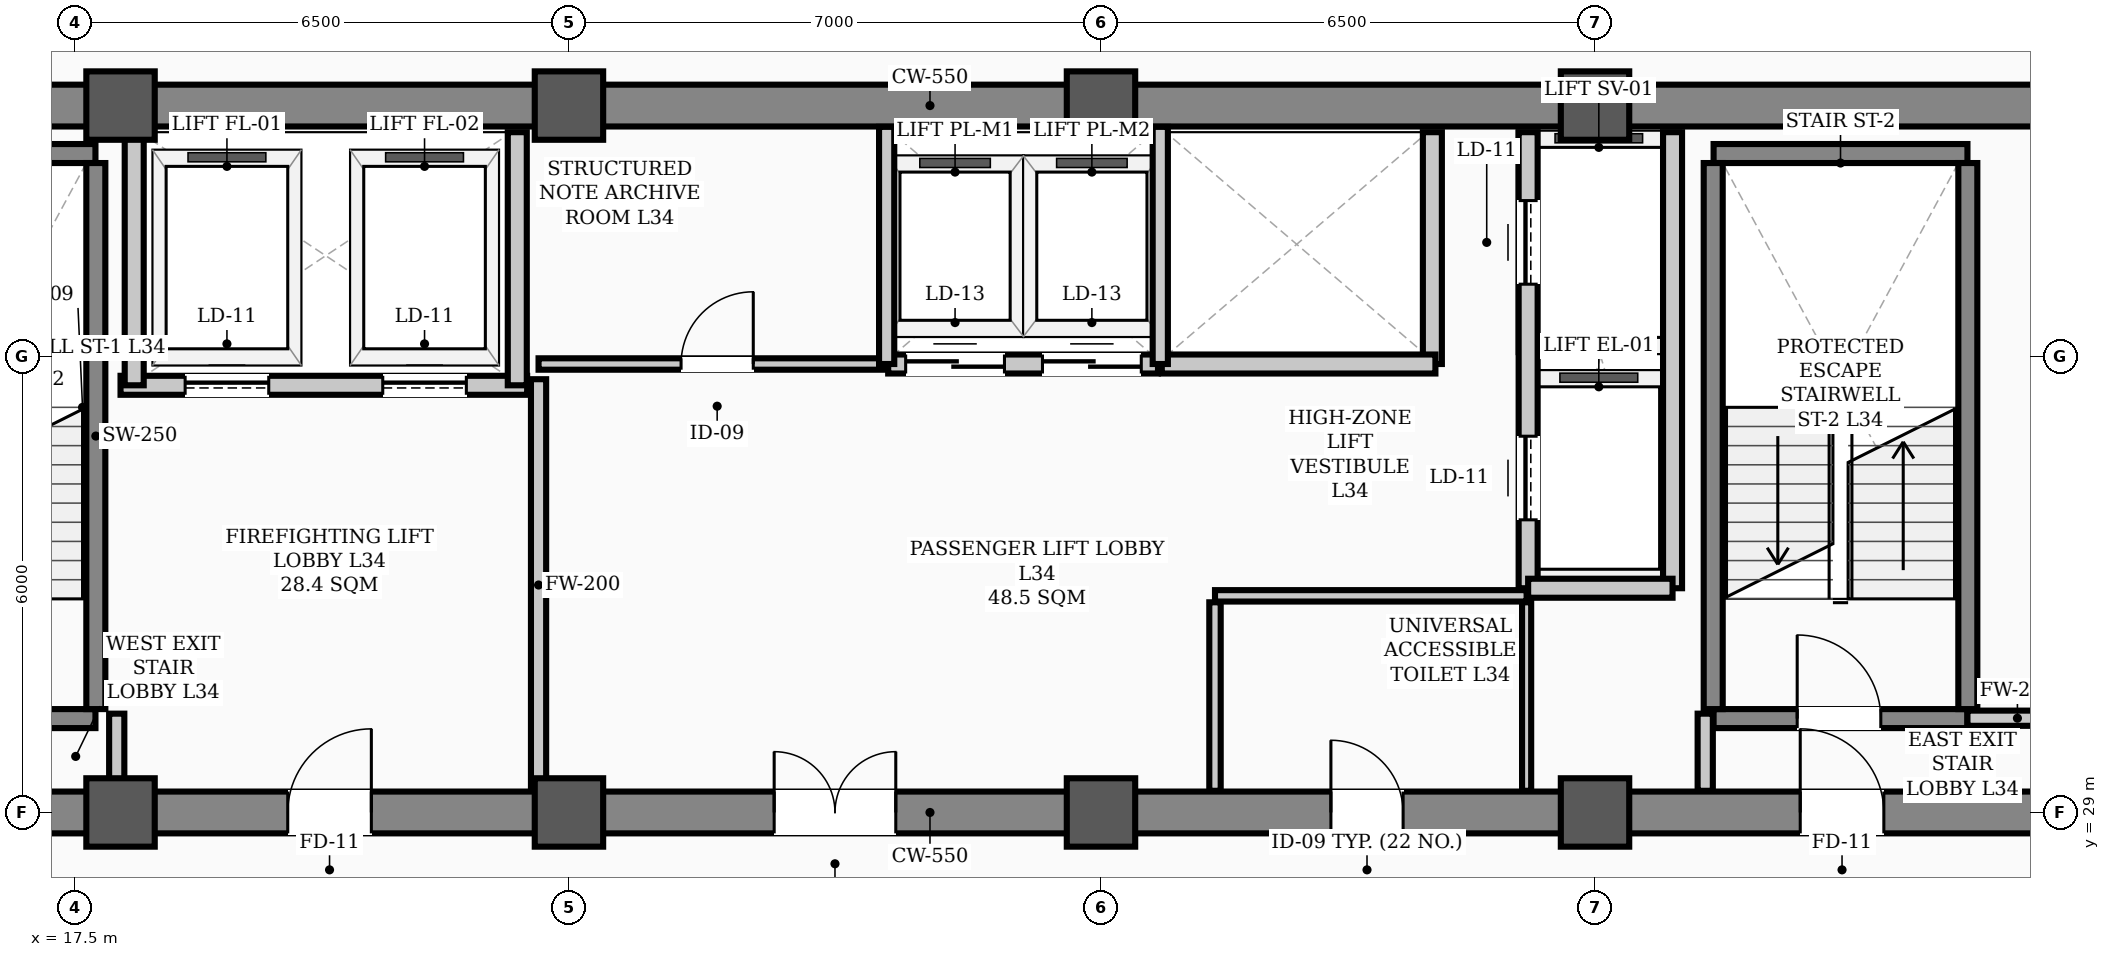
"""IFC4 building model, lengths in metres.
Left out: names, types, materials, properties, quantities, classifications, styles, units other than length and angle.
Written with IfcOpenShell. Run it as: python <this file> out.ifc"""

import sys

from ifc_helpers import new_model, si_unit, direction, frame, frame_2d, origin, origin_2d, place, context, subcontext, project, spatial, rectangle, hollow_rectangle, extrude, element, fill, save


model = new_model("IFC4")
c1 = context("Model", 3, precision=1e-05, world=origin(), true_north=direction((0.0, 1.0)))
c2 = subcontext(c1, "Body", "Model", "MODEL_VIEW")
j1 = project(units=[si_unit("LENGTHUNIT", "METRE"), si_unit("PLANEANGLEUNIT", "RADIAN")], contexts=[c1])
p1 = place(None, origin())
s1 = spatial("IfcSite", under=j1, at=p1, CompositionType="ELEMENT")
p2 = place(p1, origin())
s2 = spatial("IfcBuilding", under=s1, at=p2, CompositionType="ELEMENT")
p3 = place(p2, frame((0.0, 0.0, 138.3)))
s3 = spatial("IfcBuildingStorey", under=s2, at=p3, CompositionType="ELEMENT", Elevation=138.3)
for number, where, z_axis, x_axis in (
    (1, (18.1, 29.0, 0.0), (0.0, 0.0, 1.0), (1.0, 0.0, 0.0)),
    (2, (18.1, 38.3, 0.0), (0.0, 0.0, 1.0), (1.0, 0.0, 0.0)),
    (3, (24.0, 29.0, 0.0), (0.0, 0.0, 1.0), (1.0, 0.0, 0.0)),
    (4, (24.0, 38.3, 0.0), (0.0, 0.0, 1.0), (1.0, 0.0, 0.0)),
    (5, (31.0, 29.0, 0.0), (0.0, 0.0, 1.0), (1.0, 0.0, 0.0)),
    (6, (31.0, 38.3, 0.0), (0.0, 0.0, 1.0), (1.0, 0.0, 0.0)),
    (7, (37.5, 29.0, 0.0), (0.0, 0.0, 1.0), (1.0, 0.0, 0.0)),
    (8, (37.5, 38.3, 0.0), (0.0, 0.0, 1.0), (1.0, 0.0, 0.0)),
):
    element("IfcColumn", number, at=place(p3, frame(where, z_axis=z_axis, x_axis=x_axis)), inside=s3, PredefinedType="COLUMN", context=c2, shape_type="SweptSolid", body=[
        extrude(hollow_rectangle(XDim=0.9, YDim=0.9, WallThickness=0.035, InnerFilletRadius=0.017, OuterFilletRadius=0.052, at=origin_2d()), origin(), (0.0, 0.0, 1.0), 3.9),
    ])
p4 = place(p3, frame((13.5, 29.0, 0.0), z_axis=(0.0, 0.0, 1.0), x_axis=(1.0, 0.0, 0.0)))
e9 = element("IfcWall", 9, at=p4, inside=s3, PredefinedType="SHEAR", context=c2, shape_type="SweptSolid", body=[
    extrude(rectangle(XDim=30.5, YDim=0.55, at=frame_2d((15.25, 0.0))), origin(), (0.0, 0.0, 1.0), 3.66),
])
p5 = place(p4, frame((1.75, 0.0, 0.0)))
e10 = element("IfcOpeningElement", 10, at=p5, cuts=e9, PredefinedType="OPENING", context=c2, shape_type="SweptSolid", body=[
    extrude(rectangle(XDim=1.1, YDim=2.08, at=frame_2d((0.55, 1.04))), frame((0.0, 0.285, 0.0), z_axis=(0.0, -1.0, 0.0), x_axis=(1.0, 0.0, 0.0)), (0.0, 0.0, 1.0), 0.57),
])
p6 = place(p4, frame((26.7, 0.0, 0.0)))
e11 = element("IfcOpeningElement", 11, at=p6, cuts=e9, PredefinedType="OPENING", context=c2, shape_type="SweptSolid", body=[
    extrude(rectangle(XDim=1.1, YDim=2.08, at=frame_2d((0.55, 1.04))), frame((0.0, 0.285, 0.0), z_axis=(0.0, -1.0, 0.0), x_axis=(1.0, 0.0, 0.0)), (0.0, 0.0, 1.0), 0.57),
])
p7 = place(p4, frame((6.8, 0.0, 0.0)))
e12 = element("IfcOpeningElement", 12, at=p7, cuts=e9, PredefinedType="OPENING", context=c2, shape_type="SweptSolid", body=[
    extrude(rectangle(XDim=1.1, YDim=2.08, at=frame_2d((0.55, 1.04))), frame((0.0, 0.285, 0.0), z_axis=(0.0, -1.0, 0.0), x_axis=(1.0, 0.0, 0.0)), (0.0, 0.0, 1.0), 0.57),
])
p8 = place(p4, frame((13.2, 0.0, 0.0)))
e13 = element("IfcOpeningElement", 13, at=p8, cuts=e9, PredefinedType="OPENING", context=c2, shape_type="SweptSolid", body=[
    extrude(rectangle(XDim=1.6, YDim=2.08, at=frame_2d((0.8, 1.04))), frame((0.0, 0.285, 0.0), z_axis=(0.0, -1.0, 0.0), x_axis=(1.0, 0.0, 0.0)), (0.0, 0.0, 1.0), 0.57),
])
p9 = place(p4, frame((20.525, 0.0, 0.0)))
e14 = element("IfcOpeningElement", 14, at=p9, cuts=e9, PredefinedType="OPENING", context=c2, shape_type="SweptSolid", body=[
    extrude(rectangle(XDim=0.95, YDim=2.08, at=frame_2d((0.475, 1.04))), frame((0.0, 0.285, 0.0), z_axis=(0.0, -1.0, 0.0), x_axis=(1.0, 0.0, 0.0)), (0.0, 0.0, 1.0), 0.57),
])
p10 = place(p3, frame((13.5, 38.3, 0.0), z_axis=(0.0, 0.0, 1.0), x_axis=(1.0, 0.0, 0.0)))
e15 = element("IfcWall", 15, at=p10, inside=s3, PredefinedType="SHEAR", context=c2, shape_type="SweptSolid", body=[
    extrude(rectangle(XDim=30.5, YDim=0.55, at=frame_2d((15.25, 0.0))), origin(), (0.0, 0.0, 1.0), 3.66),
])
p11 = place(p3, frame((14.43, 30.235, 0.0), z_axis=(0.0, 0.0, 1.0), x_axis=(1.0, 0.0, 0.0)))
e16 = element("IfcWall", 16, at=p11, inside=s3, PredefinedType="STANDARD", context=c2, shape_type="SweptSolid", body=[
    extrude(rectangle(XDim=3.34, YDim=0.25, at=frame_2d((1.67, 0.0))), origin(), (0.0, 0.0, 1.0), 3.66),
])
p12 = place(p11, frame((1.1, 0.0, 0.0)))
e17 = element("IfcOpeningElement", 17, at=p12, cuts=e16, PredefinedType="OPENING", context=c2, shape_type="SweptSolid", body=[
    extrude(rectangle(XDim=1.1, YDim=2.08, at=frame_2d((0.55, 1.04))), frame((0.0, 0.135, 0.0), z_axis=(0.0, -1.0, 0.0), x_axis=(1.0, 0.0, 0.0)), (0.0, 0.0, 1.0), 0.27),
])
p13 = place(p3, frame((14.43, 37.669, 0.0), z_axis=(0.0, 0.0, 1.0), x_axis=(1.0, 0.0, 0.0)))
e18 = element("IfcWall", 18, at=p13, inside=s3, PredefinedType="STANDARD", context=c2, shape_type="SweptSolid", body=[
    extrude(rectangle(XDim=3.34, YDim=0.25, at=frame_2d((1.67, 0.0))), origin(), (0.0, 0.0, 1.0), 3.66),
])
p14 = place(p3, frame((17.775, 30.36, 0.0), z_axis=(0.0, 0.0, 1.0), x_axis=(0.0, 1.0, 0.0)))
e19 = element("IfcWall", 19, at=p14, inside=s3, PredefinedType="STANDARD", context=c2, shape_type="SweptSolid", body=[
    extrude(rectangle(XDim=7.184, YDim=0.25, at=frame_2d((3.592, 0.0))), origin(), (0.0, 0.0, 1.0), 3.66),
])
p15 = place(p3, frame((39.06, 30.235, 0.0), z_axis=(0.0, 0.0, 1.0), x_axis=(1.0, 0.0, 0.0)))
e20 = element("IfcWall", 20, at=p15, inside=s3, PredefinedType="STANDARD", context=c2, shape_type="SweptSolid", body=[
    extrude(rectangle(XDim=3.34, YDim=0.25, at=frame_2d((1.67, 0.0))), origin(), (0.0, 0.0, 1.0), 3.66),
])
p16 = place(p15, frame((1.1, 0.0, 0.0)))
e21 = element("IfcOpeningElement", 21, at=p16, cuts=e20, PredefinedType="OPENING", context=c2, shape_type="SweptSolid", body=[
    extrude(rectangle(XDim=1.1, YDim=2.08, at=frame_2d((0.55, 1.04))), frame((0.0, 0.135, 0.0), z_axis=(0.0, -1.0, 0.0), x_axis=(1.0, 0.0, 0.0)), (0.0, 0.0, 1.0), 0.27),
])
p17 = place(p3, frame((39.06, 37.669, 0.0), z_axis=(0.0, 0.0, 1.0), x_axis=(1.0, 0.0, 0.0)))
e22 = element("IfcWall", 22, at=p17, inside=s3, PredefinedType="STANDARD", context=c2, shape_type="SweptSolid", body=[
    extrude(rectangle(XDim=3.34, YDim=0.25, at=frame_2d((1.67, 0.0))), origin(), (0.0, 0.0, 1.0), 3.66),
])
for number, where, z_axis, x_axis in (
    (23, (39.055, 30.36, 0.0), (0.0, 0.0, 1.0), (0.0, 1.0, 0.0)),
    (24, (42.405, 30.36, 0.0), (0.0, 0.0, 1.0), (0.0, 1.0, 0.0)),
):
    element("IfcWall", number, at=place(p3, frame(where, z_axis=z_axis, x_axis=x_axis)), inside=s3, PredefinedType="STANDARD", context=c2, shape_type="SweptSolid", body=[
        extrude(rectangle(XDim=7.184, YDim=0.25, at=frame_2d((3.592, 0.0))), origin(), (0.0, 0.0, 1.0), 3.66),
    ])
p18 = place(p3, frame((18.1, 34.62, 0.0), z_axis=(0.0, 0.0, 1.0), x_axis=(1.0, 0.0, 0.0)))
e25 = element("IfcWall", 25, at=p18, inside=s3, PredefinedType="STANDARD", context=c2, shape_type="SweptSolid", body=[
    extrude(rectangle(XDim=5.35, YDim=0.25, at=frame_2d((2.675, 0.0))), origin(), (0.0, 0.0, 1.0), 3.66),
])
p19 = place(p18, frame((0.85, 0.0, 0.0)))
e26 = element("IfcOpeningElement", 26, at=p19, cuts=e25, PredefinedType="OPENING", context=c2, shape_type="SweptSolid", body=[
    extrude(rectangle(XDim=1.1, YDim=2.08, at=frame_2d((0.55, 1.04))), frame((0.0, 0.135, 0.0), z_axis=(0.0, -1.0, 0.0), x_axis=(1.0, 0.0, 0.0)), (0.0, 0.0, 1.0), 0.27),
])
p20 = place(p18, frame((3.45, 0.0, 0.0)))
e27 = element("IfcOpeningElement", 27, at=p20, cuts=e25, PredefinedType="OPENING", context=c2, shape_type="SweptSolid", body=[
    extrude(rectangle(XDim=1.1, YDim=2.08, at=frame_2d((0.55, 1.04))), frame((0.0, 0.135, 0.0), z_axis=(0.0, -1.0, 0.0), x_axis=(1.0, 0.0, 0.0)), (0.0, 0.0, 1.0), 0.27),
])
p21 = place(p3, frame((36.62, 31.95, 0.0), z_axis=(0.0, 0.0, 1.0), x_axis=(0.0, 1.0, 0.0)))
e28 = element("IfcWall", 28, at=p21, inside=s3, PredefinedType="STANDARD", context=c2, shape_type="SweptSolid", body=[
    extrude(rectangle(XDim=6.0, YDim=0.25, at=frame_2d((3.0, 0.0))), origin(), (0.0, 0.0, 1.0), 2.24),
])
p22 = place(p21, frame((0.9, 0.0, 0.0)))
e29 = element("IfcOpeningElement", 29, at=p22, cuts=e28, PredefinedType="OPENING", context=c2, shape_type="SweptSolid", body=[
    extrude(rectangle(XDim=1.1, YDim=2.08, at=frame_2d((0.55, 1.04))), frame((0.0, 0.135, 0.0), z_axis=(0.0, -1.0, 0.0), x_axis=(1.0, 0.0, 0.0)), (0.0, 0.0, 1.0), 0.27),
])
p23 = place(p21, frame((4.0, 0.0, 0.0)))
e30 = element("IfcOpeningElement", 30, at=p23, cuts=e28, PredefinedType="OPENING", context=c2, shape_type="SweptSolid", body=[
    extrude(rectangle(XDim=1.1, YDim=2.08, at=frame_2d((0.55, 1.04))), frame((0.0, 0.135, 0.0), z_axis=(0.0, -1.0, 0.0), x_axis=(1.0, 0.0, 0.0)), (0.0, 0.0, 1.0), 0.27),
])
p24 = place(p3, frame((38.52, 31.95, 0.0), z_axis=(0.0, 0.0, 1.0), x_axis=(0.0, 1.0, 0.0)))
e31 = element("IfcWall", 31, at=p24, inside=s3, PredefinedType="STANDARD", context=c2, shape_type="SweptSolid", body=[
    extrude(rectangle(XDim=6.0, YDim=0.25, at=frame_2d((3.0, 0.0))), origin(), (0.0, 0.0, 1.0), 2.24),
])
p25 = place(p3, frame((36.62, 31.95, 0.0), z_axis=(0.0, 0.0, 1.0), x_axis=(1.0, 0.0, 0.0)))
e32 = element("IfcWall", 32, at=p25, inside=s3, PredefinedType="STANDARD", context=c2, shape_type="SweptSolid", body=[
    extrude(rectangle(XDim=1.9, YDim=0.25, at=frame_2d((0.95, 0.0))), origin(), (0.0, 0.0, 1.0), 3.48),
])
for number, where, z_axis, x_axis in (
    (33, (18.28, 34.62, 0.0), (0.0, 0.0, 1.0), (0.0, 1.0, 0.0)),
    (34, (23.32, 34.62, 0.0), (0.0, 0.0, 1.0), (0.0, 1.0, 0.0)),
):
    element("IfcWall", number, at=place(p3, frame(where, z_axis=z_axis, x_axis=x_axis)), inside=s3, PredefinedType="STANDARD", context=c2, shape_type="SweptSolid", body=[
        extrude(rectangle(XDim=3.33, YDim=0.25, at=frame_2d((1.665, 0.0))), origin(), (0.0, 0.0, 1.0), 2.24),
    ])
p26 = place(p3, frame((35.36, 34.9, 0.0), z_axis=(0.0, 0.0, 1.0), x_axis=(0.0, 1.0, 0.0)))
e35 = element("IfcWall", 35, at=p26, inside=s3, PredefinedType="STANDARD", context=c2, shape_type="SweptSolid", body=[
    extrude(rectangle(XDim=3.05, YDim=0.25, at=frame_2d((1.525, 0.0))), origin(), (0.0, 0.0, 1.0), 2.24),
])
p27 = place(p3, frame((28.2, 34.9, 0.0), z_axis=(0.0, 0.0, 1.0), x_axis=(1.0, 0.0, 0.0)))
e36 = element("IfcWall", 36, at=p27, inside=s3, PredefinedType="STANDARD", context=c2, shape_type="SweptSolid", body=[
    extrude(rectangle(XDim=3.55, YDim=0.25, at=frame_2d((1.775, 0.0))), origin(), (0.0, 0.0, 1.0), 3.66),
])
p28 = place(p27, frame((0.23, 0.0, 0.0)))
e37 = element("IfcOpeningElement", 37, at=p28, cuts=e36, PredefinedType="OPENING", context=c2, shape_type="SweptSolid", body=[
    extrude(rectangle(XDim=1.3, YDim=2.08, at=frame_2d((0.65, 1.04))), frame((0.0, 0.135, 0.0), z_axis=(0.0, -1.0, 0.0), x_axis=(1.0, 0.0, 0.0)), (0.0, 0.0, 1.0), 0.27),
])
p29 = place(p27, frame((2.03, 0.0, 0.0)))
e38 = element("IfcOpeningElement", 38, at=p29, cuts=e36, PredefinedType="OPENING", context=c2, shape_type="SweptSolid", body=[
    extrude(rectangle(XDim=1.3, YDim=2.08, at=frame_2d((0.65, 1.04))), frame((0.0, 0.135, 0.0), z_axis=(0.0, -1.0, 0.0), x_axis=(1.0, 0.0, 0.0)), (0.0, 0.0, 1.0), 0.27),
])
p30 = place(p3, frame((31.8, 34.9, 0.0), z_axis=(0.0, 0.0, 1.0), x_axis=(1.0, 0.0, 0.0)))
e39 = element("IfcWall", 39, at=p30, inside=s3, PredefinedType="STANDARD", context=c2, shape_type="SweptSolid", body=[
    extrude(rectangle(XDim=3.6, YDim=0.25, at=frame_2d((1.8, 0.0))), origin(), (0.0, 0.0, 1.0), 3.66),
])
p31 = place(p3, frame((42.4, 30.24, 0.0), z_axis=(0.0, 0.0, 1.0), x_axis=(1.0, 0.0, 0.0)))
e40 = element("IfcWall", 40, at=p31, inside=s3, PredefinedType="STANDARD", context=c2, shape_type="SweptSolid", body=[
    extrude(rectangle(XDim=1.315, YDim=0.2, at=frame_2d((0.658, 0.0))), origin(), (0.0, 0.0, 1.0), 2.24),
])
p32 = place(p3, frame((23.6, 34.9, 0.0), z_axis=(0.0, 0.0, 1.0), x_axis=(1.0, 0.0, 0.0)))
e41 = element("IfcWall", 41, at=p32, inside=s3, PredefinedType="PARTITIONING", context=c2, shape_type="SweptSolid", body=[
    extrude(rectangle(XDim=4.58, YDim=0.15, at=frame_2d((2.29, 0.0))), origin(), (0.0, 0.0, 1.0), 3.66),
])
p33 = place(p32, frame((1.875, 0.0, 0.0)))
e42 = element("IfcOpeningElement", 42, at=p33, cuts=e41, PredefinedType="OPENING", context=c2, shape_type="SweptSolid", body=[
    extrude(rectangle(XDim=0.95, YDim=2.08, at=frame_2d((0.475, 1.04))), frame((0.0, 0.085, 0.0), z_axis=(0.0, -1.0, 0.0), x_axis=(1.0, 0.0, 0.0)), (0.0, 0.0, 1.0), 0.17),
])
p34 = place(p3, frame((32.5, 31.85, 0.0), z_axis=(0.0, 0.0, 1.0), x_axis=(1.0, 0.0, 0.0)))
e43 = element("IfcWall", 43, at=p34, inside=s3, PredefinedType="PARTITIONING", context=c2, shape_type="SweptSolid", body=[
    extrude(rectangle(XDim=4.1, YDim=0.15, at=frame_2d((2.05, 0.0))), origin(), (0.0, 0.0, 1.0), 3.66),
])
for number, where, z_axis, x_axis in (
    (44, (18.05, 29.285, 0.0), (0.0, 0.0, 1.0), (0.0, 1.0, 0.0)),
    (45, (38.95, 29.285, 0.0), (0.0, 0.0, 1.0), (0.0, 1.0, 0.0)),
):
    element("IfcWall", number, at=place(p3, frame(where, z_axis=z_axis, x_axis=x_axis)), inside=s3, PredefinedType="STANDARD", context=c2, shape_type="SweptSolid", body=[
        extrude(rectangle(XDim=1.015, YDim=0.2, at=frame_2d((0.508, 0.0))), origin(), (0.0, 0.0, 1.0), 2.24),
    ])
p35 = place(p3, frame((23.6, 29.285, 0.0), z_axis=(0.0, 0.0, 1.0), x_axis=(0.0, 1.0, 0.0)))
e46 = element("IfcWall", 46, at=p35, inside=s3, PredefinedType="STANDARD", context=c2, shape_type="SweptSolid", body=[
    extrude(rectangle(XDim=5.415, YDim=0.2, at=frame_2d((2.708, 0.0))), origin(), (0.0, 0.0, 1.0), 2.24),
])
p36 = place(p3, frame((32.5, 29.285, 0.0), z_axis=(0.0, 0.0, 1.0), x_axis=(0.0, 1.0, 0.0)))
e47 = element("IfcWall", 47, at=p36, inside=s3, PredefinedType="PARTITIONING", context=c2, shape_type="SweptSolid", body=[
    extrude(rectangle(XDim=2.48, YDim=0.15, at=frame_2d((1.24, 0.0))), origin(), (0.0, 0.0, 1.0), 2.24),
])
p37 = place(p3, frame((36.6, 29.285, 0.0), z_axis=(0.0, 0.0, 1.0), x_axis=(0.0, 1.0, 0.0)))
e48 = element("IfcWall", 48, at=p37, inside=s3, PredefinedType="PARTITIONING", context=c2, shape_type="SweptSolid", body=[
    extrude(rectangle(XDim=2.48, YDim=0.12, at=frame_2d((1.24, 0.0))), origin(), (0.0, 0.0, 1.0), 2.24),
])
for number, where, z_axis, x_axis in (
    (49, (28.18, 34.9, 0.0), (0.0, 0.0, 1.0), (0.0, 1.0, 0.0)),
    (50, (31.78, 34.9, 0.0), (0.0, 0.0, 1.0), (0.0, 1.0, 0.0)),
):
    element("IfcWall", number, at=place(p3, frame(where, z_axis=z_axis, x_axis=x_axis)), inside=s3, PredefinedType="STANDARD", context=c2, shape_type="SweptSolid", body=[
        extrude(rectangle(XDim=3.12, YDim=0.2, at=frame_2d((1.56, 0.0))), origin(), (0.0, 0.0, 1.0), 2.24),
    ])
p38 = place(p16, origin())
e51 = element("IfcDoor", 51, at=p38, inside=s3, OperationType="SINGLE_SWING_LEFT", PredefinedType="DOOR", context=c2, shape_type="SweptSolid", body=[
    extrude(rectangle(XDim=1.1, YDim=2.08, at=frame_2d((0.55, 1.04))), frame((0.0, 0.025, 0.0), z_axis=(0.0, -1.0, 0.0), x_axis=(1.0, 0.0, 0.0)), (0.0, 0.0, 1.0), 0.05),
])
fill(e21, e51)
p39 = place(p6, origin())
e52 = element("IfcDoor", 52, at=p39, inside=s3, OperationType="SINGLE_SWING_LEFT", PredefinedType="DOOR", context=c2, shape_type="SweptSolid", body=[
    extrude(rectangle(XDim=1.1, YDim=2.08, at=frame_2d((0.55, 1.04))), frame((0.0, 0.025, 0.0), z_axis=(0.0, -1.0, 0.0), x_axis=(1.0, 0.0, 0.0)), (0.0, 0.0, 1.0), 0.05),
])
fill(e11, e52)
p40 = place(p7, origin())
e53 = element("IfcDoor", 53, at=p40, inside=s3, OperationType="SINGLE_SWING_RIGHT", PredefinedType="DOOR", context=c2, shape_type="SweptSolid", body=[
    extrude(rectangle(XDim=1.1, YDim=2.08, at=frame_2d((0.55, 1.04))), frame((0.0, 0.025, 0.0), z_axis=(0.0, -1.0, 0.0), x_axis=(1.0, 0.0, 0.0)), (0.0, 0.0, 1.0), 0.05),
])
fill(e12, e53)
p41 = place(p8, origin())
e54 = element("IfcDoor", 54, at=p41, inside=s3, OperationType="DOUBLE_DOOR_SINGLE_SWING", PredefinedType="DOOR", context=c2, shape_type="SweptSolid", body=[
    extrude(rectangle(XDim=1.6, YDim=2.08, at=frame_2d((0.8, 1.04))), frame((0.0, 0.025, 0.0), z_axis=(0.0, -1.0, 0.0), x_axis=(1.0, 0.0, 0.0)), (0.0, 0.0, 1.0), 0.05),
])
fill(e13, e54)
p42 = place(p33, origin())
e55 = element("IfcDoor", 55, at=p42, inside=s3, OperationType="SINGLE_SWING_RIGHT", PredefinedType="DOOR", context=c2, shape_type="SweptSolid", body=[
    extrude(rectangle(XDim=0.95, YDim=2.08, at=frame_2d((0.475, 1.04))), frame((0.0, 0.025, 0.0), z_axis=(0.0, -1.0, 0.0), x_axis=(1.0, 0.0, 0.0)), (0.0, 0.0, 1.0), 0.05),
])
fill(e42, e55)
p43 = place(p9, origin())
e56 = element("IfcDoor", 56, at=p43, inside=s3, OperationType="SINGLE_SWING_LEFT", PredefinedType="DOOR", context=c2, shape_type="SweptSolid", body=[
    extrude(rectangle(XDim=0.95, YDim=2.08, at=frame_2d((0.475, 1.04))), frame((0.0, 0.025, 0.0), z_axis=(0.0, -1.0, 0.0), x_axis=(1.0, 0.0, 0.0)), (0.0, 0.0, 1.0), 0.05),
])
fill(e14, e56)
p44 = place(p19, origin())
e57 = element("IfcDoor", 57, at=p44, inside=s3, OperationType="SLIDING_TO_LEFT", PredefinedType="DOOR", context=c2, shape_type="SweptSolid", body=[
    extrude(rectangle(XDim=1.1, YDim=2.08, at=frame_2d((0.55, 1.04))), frame((0.0, 0.025, 0.0), z_axis=(0.0, -1.0, 0.0), x_axis=(1.0, 0.0, 0.0)), (0.0, 0.0, 1.0), 0.05),
])
fill(e26, e57)
p45 = place(p20, origin())
e58 = element("IfcDoor", 58, at=p45, inside=s3, OperationType="SLIDING_TO_LEFT", PredefinedType="DOOR", context=c2, shape_type="SweptSolid", body=[
    extrude(rectangle(XDim=1.1, YDim=2.08, at=frame_2d((0.55, 1.04))), frame((0.0, 0.025, 0.0), z_axis=(0.0, -1.0, 0.0), x_axis=(1.0, 0.0, 0.0)), (0.0, 0.0, 1.0), 0.05),
])
fill(e27, e58)
p46 = place(p22, origin())
e59 = element("IfcDoor", 59, at=p46, inside=s3, OperationType="SLIDING_TO_LEFT", PredefinedType="DOOR", context=c2, shape_type="SweptSolid", body=[
    extrude(rectangle(XDim=1.1, YDim=2.08, at=frame_2d((0.55, 1.04))), frame((0.0, 0.025, 0.0), z_axis=(0.0, -1.0, 0.0), x_axis=(1.0, 0.0, 0.0)), (0.0, 0.0, 1.0), 0.05),
])
fill(e29, e59)
p47 = place(p23, origin())
e60 = element("IfcDoor", 60, at=p47, inside=s3, OperationType="SLIDING_TO_LEFT", PredefinedType="DOOR", context=c2, shape_type="SweptSolid", body=[
    extrude(rectangle(XDim=1.1, YDim=2.08, at=frame_2d((0.55, 1.04))), frame((0.0, 0.025, 0.0), z_axis=(0.0, -1.0, 0.0), x_axis=(1.0, 0.0, 0.0)), (0.0, 0.0, 1.0), 0.05),
])
fill(e30, e60)
p48 = place(p28, origin())
e61 = element("IfcDoor", 61, at=p48, inside=s3, OperationType="DOUBLE_DOOR_SLIDING", PredefinedType="DOOR", context=c2, shape_type="SweptSolid", body=[
    extrude(rectangle(XDim=1.3, YDim=2.08, at=frame_2d((0.65, 1.04))), frame((0.0, 0.025, 0.0), z_axis=(0.0, -1.0, 0.0), x_axis=(1.0, 0.0, 0.0)), (0.0, 0.0, 1.0), 0.05),
])
fill(e37, e61)
p49 = place(p29, origin())
e62 = element("IfcDoor", 62, at=p49, inside=s3, OperationType="DOUBLE_DOOR_SLIDING", PredefinedType="DOOR", context=c2, shape_type="SweptSolid", body=[
    extrude(rectangle(XDim=1.3, YDim=2.08, at=frame_2d((0.65, 1.04))), frame((0.0, 0.025, 0.0), z_axis=(0.0, -1.0, 0.0), x_axis=(1.0, 0.0, 0.0)), (0.0, 0.0, 1.0), 0.05),
])
fill(e38, e62)
save(model, sys.argv[1])
